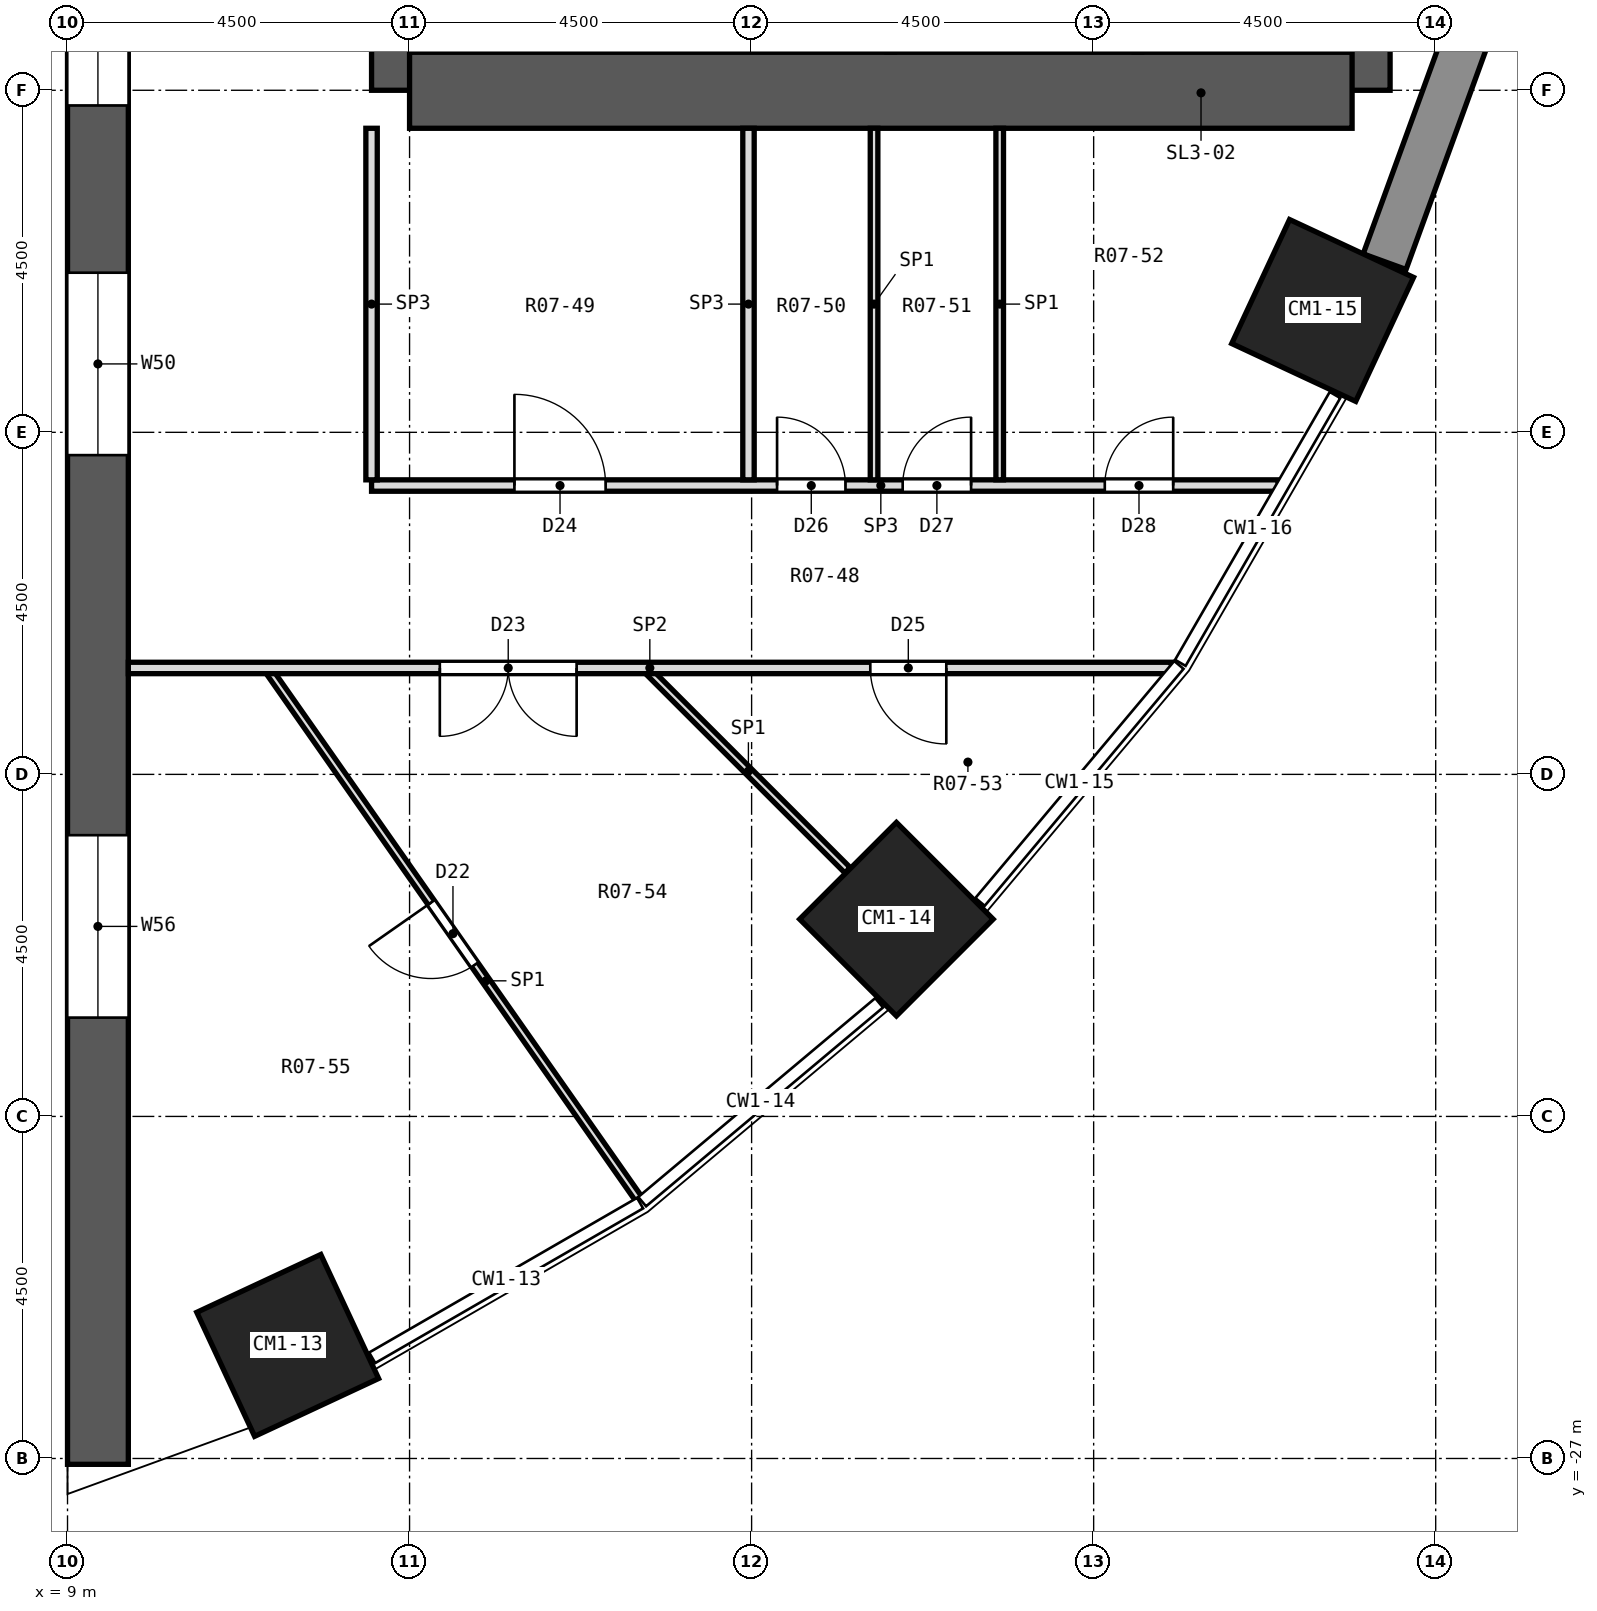
"""IFC4 building model, lengths in metres.
Left out: names, types, materials, properties, quantities, classifications, styles, units other than length and angle.
Written with IfcOpenShell. Run it as: python <this file> out.ifc"""

import sys

from ifc_helpers import new_model, si_unit, direction, frame, frame_2d, origin, origin_2d, place, context, subcontext, project, spatial, polyline, rectangle, outline, extrude, element, fill, save


model = new_model("IFC4")
c1 = context("Model", 3, precision=1e-05, world=origin(), true_north=direction((0.0, 1.0)))
c2 = subcontext(c1, "Body", "Model", "MODEL_VIEW")
j1 = project(units=[si_unit("LENGTHUNIT", "METRE"), si_unit("PLANEANGLEUNIT", "RADIAN")], contexts=[c1])
p1 = place(None, origin())
s1 = spatial("IfcSite", under=j1, at=p1, CompositionType="ELEMENT")
p2 = place(p1, origin())
s2 = spatial("IfcBuilding", under=s1, at=p2, CompositionType="ELEMENT")
p3 = place(p2, frame((0.0, 0.0, 17.6)))
s3 = spatial("IfcBuildingStorey", under=s2, at=p3, CompositionType="ELEMENT", Elevation=17.6)
for number, where, z_axis, x_axis in (
    (1, (11.897, -25.512, 0.0), (0.0, 0.0, 1.0), (0.423, -0.906, 0.0)),
    (2, (19.905, -19.905, 0.0), (0.0, 0.0, 1.0), (0.707, -0.707, 0.0)),
    (3, (25.512, -11.897, 0.0), (0.0, 0.0, 1.0), (0.906, -0.423, 0.0)),
):
    element("IfcColumn", number, at=place(p3, frame(where, z_axis=z_axis, x_axis=x_axis)), inside=s3, PredefinedType="COLUMN", context=c2, shape_type="SweptSolid", body=[
        extrude(rectangle(XDim=1.8, YDim=1.8, at=origin_2d()), origin(), (0.0, 0.0, 1.0), 4.2),
    ])
p4 = place(p3, frame((13.5, -9.0, 0.0), z_axis=(0.0, 0.0, 1.0), x_axis=(0.0, 1.0, 0.0)))
e4 = element("IfcWall", 4, at=p4, inside=s3, PredefinedType="SHEAR", context=c2, shape_type="SweptSolid", body=[
    extrude(rectangle(XDim=18.0, YDim=1.0, at=frame_2d((9.0, 0.0))), origin(), (0.0, 0.0, 1.0), 4.2),
])
p5 = place(p4, frame((15.4, 0.0, 0.0)))
e5 = element("IfcOpeningElement", 5, at=p5, cuts=e4, PredefinedType="OPENING", context=c2, shape_type="SweptSolid", body=[
    extrude(rectangle(XDim=1.2, YDim=2.1, at=frame_2d((0.6, 1.05))), frame((0.0, 0.512, 0.0), z_axis=(0.0, -1.0, 0.0), x_axis=(1.0, 0.0, 0.0)), (0.0, 0.0, 1.0), 1.024),
])
p6 = place(p4, frame((1.4, 0.0, 0.0)))
e6 = element("IfcOpeningElement", 6, at=p6, cuts=e4, PredefinedType="OPENING", context=c2, shape_type="SweptSolid", body=[
    extrude(rectangle(XDim=1.2, YDim=2.1, at=frame_2d((0.6, 1.05))), frame((0.0, 0.512, 0.0), z_axis=(0.0, -1.0, 0.0), x_axis=(1.0, 0.0, 0.0)), (0.0, 0.0, 1.0), 1.024),
])
p7 = place(p4, frame((7.5, 0.0, 0.0)))
e7 = element("IfcOpeningElement", 7, at=p7, cuts=e4, PredefinedType="OPENING", context=c2, shape_type="SweptSolid", body=[
    extrude(rectangle(XDim=3.0, YDim=2.4, at=frame_2d((1.5, 1.2))), frame((0.0, 0.512, 0.0), z_axis=(0.0, -1.0, 0.0), x_axis=(1.0, 0.0, 0.0)), (0.0, 0.0, 1.0), 1.024),
])
p8 = place(p3, frame((25.9, -9.0, 0.0), z_axis=(0.0, 0.0, 1.0), x_axis=(0.0, 1.0, 0.0)))
e8 = element("IfcWall", 8, at=p8, inside=s3, PredefinedType="SHEAR", context=c2, shape_type="SweptSolid", body=[
    extrude(rectangle(XDim=18.0, YDim=1.0, at=frame_2d((9.0, 0.0))), origin(), (0.0, 0.0, 1.0), 4.2),
])
p9 = place(p3, frame((13.5, -9.0, 0.0), z_axis=(0.0, 0.0, 1.0), x_axis=(1.0, 0.0, 0.0)))
e9 = element("IfcWall", 9, at=p9, inside=s3, PredefinedType="SHEAR", context=c2, shape_type="SweptSolid", body=[
    extrude(rectangle(XDim=12.4, YDim=1.0, at=frame_2d((6.2, 0.0))), origin(), (0.0, 0.0, 1.0), 4.2),
])
p10 = place(p3, frame((9.4, -27.077, 0.0), z_axis=(0.0, 0.0, 1.0), x_axis=(0.0, 1.0, 0.0)))
e10 = element("IfcWall", 10, at=p10, inside=s3, PredefinedType="SHEAR", context=c2, shape_type="SweptSolid", body=[
    extrude(rectangle(XDim=54.154, YDim=0.8, at=frame_2d((27.077, 0.0))), origin(), (0.0, 0.0, 1.0), 4.2),
])
p11 = place(p10, frame((13.277, 0.0, 0.9)))
e11 = element("IfcOpeningElement", 11, at=p11, cuts=e10, PredefinedType="OPENING", context=c2, shape_type="SweptSolid", body=[
    extrude(rectangle(XDim=2.4, YDim=2.1, at=frame_2d((1.2, 1.05))), frame((0.0, 0.412, 0.0), z_axis=(0.0, -1.0, 0.0), x_axis=(1.0, 0.0, 0.0)), (0.0, 0.0, 1.0), 0.824),
])
p12 = place(p10, frame((17.877, 0.0, 0.9)))
e12 = element("IfcOpeningElement", 12, at=p12, cuts=e10, PredefinedType="OPENING", context=c2, shape_type="SweptSolid", body=[
    extrude(rectangle(XDim=2.4, YDim=2.1, at=frame_2d((1.2, 1.05))), frame((0.0, 0.412, 0.0), z_axis=(0.0, -1.0, 0.0), x_axis=(1.0, 0.0, 0.0)), (0.0, 0.0, 1.0), 0.824),
])
p13 = place(p10, frame((22.477, 0.0, 0.9)))
e13 = element("IfcOpeningElement", 13, at=p13, cuts=e10, PredefinedType="OPENING", context=c2, shape_type="SweptSolid", body=[
    extrude(rectangle(XDim=2.4, YDim=2.1, at=frame_2d((1.2, 1.05))), frame((0.0, 0.412, 0.0), z_axis=(0.0, -1.0, 0.0), x_axis=(1.0, 0.0, 0.0)), (0.0, 0.0, 1.0), 0.824),
])
p14 = place(p10, frame((29.277, 0.0, 0.9)))
e14 = element("IfcOpeningElement", 14, at=p14, cuts=e10, PredefinedType="OPENING", context=c2, shape_type="SweptSolid", body=[
    extrude(rectangle(XDim=2.4, YDim=2.1, at=frame_2d((1.2, 1.05))), frame((0.0, 0.412, 0.0), z_axis=(0.0, -1.0, 0.0), x_axis=(1.0, 0.0, 0.0)), (0.0, 0.0, 1.0), 0.824),
])
p15 = place(p10, frame((33.877, 0.0, 0.9)))
e15 = element("IfcOpeningElement", 15, at=p15, cuts=e10, PredefinedType="OPENING", context=c2, shape_type="SweptSolid", body=[
    extrude(rectangle(XDim=2.4, YDim=2.1, at=frame_2d((1.2, 1.05))), frame((0.0, 0.412, 0.0), z_axis=(0.0, -1.0, 0.0), x_axis=(1.0, 0.0, 0.0)), (0.0, 0.0, 1.0), 0.824),
])
p16 = place(p10, frame((38.477, 0.0, 0.9)))
e16 = element("IfcOpeningElement", 16, at=p16, cuts=e10, PredefinedType="OPENING", context=c2, shape_type="SweptSolid", body=[
    extrude(rectangle(XDim=2.4, YDim=2.1, at=frame_2d((1.2, 1.05))), frame((0.0, 0.412, 0.0), z_axis=(0.0, -1.0, 0.0), x_axis=(1.0, 0.0, 0.0)), (0.0, 0.0, 1.0), 0.824),
])
p17 = place(p10, frame((5.877, 0.0, 0.9)))
e17 = element("IfcOpeningElement", 17, at=p17, cuts=e10, PredefinedType="OPENING", context=c2, shape_type="SweptSolid", body=[
    extrude(rectangle(XDim=2.4, YDim=2.1, at=frame_2d((1.2, 1.05))), frame((0.0, 0.412, 0.0), z_axis=(0.0, -1.0, 0.0), x_axis=(1.0, 0.0, 0.0)), (0.0, 0.0, 1.0), 0.824),
])
p18 = place(p10, frame((45.877, 0.0, 0.9)))
e18 = element("IfcOpeningElement", 18, at=p18, cuts=e10, PredefinedType="OPENING", context=c2, shape_type="SweptSolid", body=[
    extrude(rectangle(XDim=2.4, YDim=2.1, at=frame_2d((1.2, 1.05))), frame((0.0, 0.412, 0.0), z_axis=(0.0, -1.0, 0.0), x_axis=(1.0, 0.0, 0.0)), (0.0, 0.0, 1.0), 0.824),
])
p19 = place(p3, frame((26.328, -11.255, 0.0), z_axis=(0.0, 0.0, 1.0), x_axis=(0.342034744565, 0.939687306241, 0.0)))
e19 = element("IfcWall", 19, at=p19, inside=s3, PredefinedType="SOLIDWALL", context=c2, shape_type="SweptSolid", body=[
    extrude(rectangle(XDim=4.099, YDim=0.6, at=frame_2d((2.05, 0.0))), origin(), (0.0, 0.0, 1.0), 3.6),
])
p20 = place(p3, frame((8.109, -27.755, 0.0), z_axis=(0.342019725657, -0.939690559381, 0.002039576307), x_axis=(-0.000746014046, 0.001898944844, 0.999997918734)))
e20 = element("IfcWall", 20, at=p20, inside=s3, PredefinedType="SOLIDWALL", context=c2, shape_type="SweptSolid", body=[
    extrude(outline(polyline([(0.0, 0.0), (3.6, -1.084e-19), (3.6, -3.745), (-0.0, -3.745), (0.0, 0.0)])), origin(), (0.0, 0.0, -1.0), 0.38),
])
p21 = place(p3, frame((11.666, -16.661, 0.0), z_axis=(0.0, 0.0, 1.0), x_axis=(0.573640514793, -0.819107172346, 0.0)))
e21 = element("IfcWall", 21, at=p21, inside=s3, PredefinedType="PARTITIONING", context=c2, shape_type="SweptSolid", body=[
    extrude(rectangle(XDim=8.46, YDim=0.1, at=frame_2d((4.23, 0.0))), origin(), (0.0, 0.0, 1.0), 3.6),
])
p22 = place(p21, frame((3.692, 0.0, 0.0)))
e22 = element("IfcOpeningElement", 22, at=p22, cuts=e21, PredefinedType="OPENING", context=c2, shape_type="SweptSolid", body=[
    extrude(rectangle(XDim=1.0, YDim=2.1, at=frame_2d((0.5, 1.05))), frame((0.0, 0.062, 0.0), z_axis=(0.0, -1.0, 0.0), x_axis=(1.0, 0.0, 0.0)), (0.0, 0.0, 1.0), 0.124),
])
p23 = place(p3, frame((16.653, -16.653, 0.0), z_axis=(0.0, 0.0, 1.0), x_axis=(0.707272213363, -0.706941310297, 0.0)))
e23 = element("IfcWall", 23, at=p23, inside=s3, PredefinedType="PARTITIONING", context=c2, shape_type="SweptSolid", body=[
    extrude(rectangle(XDim=3.689, YDim=0.1, at=frame_2d((1.844, 0.0))), origin(), (0.0, 0.0, 1.0), 3.6),
])
p24 = place(p3, frame((9.8, -16.6, 0.0), z_axis=(0.0, 0.0, 1.0), x_axis=(1.0, 0.0, 0.0)))
e24 = element("IfcWall", 24, at=p24, inside=s3, PredefinedType="PARTITIONING", context=c2, shape_type="SweptSolid", body=[
    extrude(rectangle(XDim=13.723, YDim=0.15, at=frame_2d((6.861, 0.0))), origin(), (0.0, 0.0, 1.0), 3.6),
])
p25 = place(p24, frame((4.098, 0.0, 0.0)))
e25 = element("IfcOpeningElement", 25, at=p25, cuts=e24, PredefinedType="OPENING", context=c2, shape_type="SweptSolid", body=[
    extrude(rectangle(XDim=1.8, YDim=2.1, at=frame_2d((0.9, 1.05))), frame((0.0, 0.087, 0.0), z_axis=(0.0, -1.0, 0.0), x_axis=(1.0, 0.0, 0.0)), (0.0, 0.0, 1.0), 0.174),
])
p26 = place(p24, frame((9.761, 0.0, 0.0)))
e26 = element("IfcOpeningElement", 26, at=p26, cuts=e24, PredefinedType="OPENING", context=c2, shape_type="SweptSolid", body=[
    extrude(rectangle(XDim=1.0, YDim=2.1, at=frame_2d((0.5, 1.05))), frame((0.0, 0.087, 0.0), z_axis=(0.0, -1.0, 0.0), x_axis=(1.0, 0.0, 0.0)), (0.0, 0.0, 1.0), 0.174),
])
p27 = place(p3, frame((13.0, -14.2, 0.0), z_axis=(0.0, 0.0, 1.0), x_axis=(1.0, 0.0, 0.0)))
e27 = element("IfcWall", 27, at=p27, inside=s3, PredefinedType="PARTITIONING", context=c2, shape_type="SweptSolid", body=[
    extrude(rectangle(XDim=11.929, YDim=0.15, at=frame_2d((5.964, 0.0))), origin(), (0.0, 0.0, 1.0), 3.6),
])
p28 = place(p27, frame((1.879, 0.0, 0.0)))
e28 = element("IfcOpeningElement", 28, at=p28, cuts=e27, PredefinedType="OPENING", context=c2, shape_type="SweptSolid", body=[
    extrude(rectangle(XDim=1.2, YDim=2.1, at=frame_2d((0.6, 1.05))), frame((0.0, 0.087, 0.0), z_axis=(0.0, -1.0, 0.0), x_axis=(1.0, 0.0, 0.0)), (0.0, 0.0, 1.0), 0.174),
])
p29 = place(p27, frame((5.335, 0.0, 0.0)))
e29 = element("IfcOpeningElement", 29, at=p29, cuts=e27, PredefinedType="OPENING", context=c2, shape_type="SweptSolid", body=[
    extrude(rectangle(XDim=0.9, YDim=2.1, at=frame_2d((0.45, 1.05))), frame((0.0, 0.087, 0.0), z_axis=(0.0, -1.0, 0.0), x_axis=(1.0, 0.0, 0.0)), (0.0, 0.0, 1.0), 0.174),
])
p30 = place(p27, frame((6.988, 0.0, 0.0)))
e30 = element("IfcOpeningElement", 30, at=p30, cuts=e27, PredefinedType="OPENING", context=c2, shape_type="SweptSolid", body=[
    extrude(rectangle(XDim=0.9, YDim=2.1, at=frame_2d((0.45, 1.05))), frame((0.0, 0.087, 0.0), z_axis=(0.0, -1.0, 0.0), x_axis=(1.0, 0.0, 0.0)), (0.0, 0.0, 1.0), 0.174),
])
p31 = place(p27, frame((9.646, 0.0, 0.0)))
e31 = element("IfcOpeningElement", 31, at=p31, cuts=e27, PredefinedType="OPENING", context=c2, shape_type="SweptSolid", body=[
    extrude(rectangle(XDim=0.9, YDim=2.1, at=frame_2d((0.45, 1.05))), frame((0.0, 0.087, 0.0), z_axis=(0.0, -1.0, 0.0), x_axis=(1.0, 0.0, 0.0)), (0.0, 0.0, 1.0), 0.174),
])
for number, where, z_axis, x_axis in (
    (32, (21.264, -14.125, 0.0), (0.0, 0.0, 1.0), (0.0, 1.0, 0.0)),
    (33, (19.611, -14.125, 0.0), (0.0, 0.0, 1.0), (0.0, 1.0, 0.0)),
):
    element("IfcWall", number, at=place(p3, frame(where, z_axis=z_axis, x_axis=x_axis)), inside=s3, PredefinedType="PARTITIONING", context=c2, shape_type="SweptSolid", body=[
        extrude(rectangle(XDim=4.625, YDim=0.1, at=frame_2d((2.312, 0.0))), origin(), (0.0, 0.0, 1.0), 3.6),
    ])
for number, where, z_axis, x_axis in (
    (34, (17.959, -14.125, 0.0), (0.0, 0.0, 1.0), (0.0, 1.0, 0.0)),
    (35, (13.0, -14.125, 0.0), (0.0, 0.0, 1.0), (0.0, 1.0, 0.0)),
):
    element("IfcWall", number, at=place(p3, frame(where, z_axis=z_axis, x_axis=x_axis)), inside=s3, PredefinedType="PARTITIONING", context=c2, shape_type="SweptSolid", body=[
        extrude(rectangle(XDim=4.625, YDim=0.15, at=frame_2d((2.312, 0.0))), origin(), (0.0, 0.0, 1.0), 3.6),
    ])
p32 = place(p22, frame((1.0, 0.0, 0.0), z_axis=(0.0, 0.0, 1.0), x_axis=(-1.0, 0.0, 0.0)))
e36 = element("IfcDoor", 36, at=p32, inside=s3, OperationType="SINGLE_SWING_RIGHT", PredefinedType="DOOR", context=c2, shape_type="SweptSolid", body=[
    extrude(rectangle(XDim=1.0, YDim=2.1, at=frame_2d((0.5, 1.05))), frame((0.0, 0.025, 0.0), z_axis=(0.0, -1.0, 0.0), x_axis=(1.0, 0.0, 0.0)), (0.0, 0.0, 1.0), 0.05),
])
fill(e22, e36)
p33 = place(p25, frame((1.8, 0.0, 0.0), z_axis=(0.0, 0.0, 1.0), x_axis=(-1.0, 0.0, 0.0)))
e37 = element("IfcDoor", 37, at=p33, inside=s3, OperationType="DOUBLE_DOOR_SINGLE_SWING", PredefinedType="DOOR", context=c2, shape_type="SweptSolid", body=[
    extrude(rectangle(XDim=1.8, YDim=2.1, at=frame_2d((0.9, 1.05))), frame((0.0, 0.025, 0.0), z_axis=(0.0, -1.0, 0.0), x_axis=(1.0, 0.0, 0.0)), (0.0, 0.0, 1.0), 0.05),
])
fill(e25, e37)
p34 = place(p28, origin())
e38 = element("IfcDoor", 38, at=p34, inside=s3, OperationType="SINGLE_SWING_LEFT", PredefinedType="DOOR", context=c2, shape_type="SweptSolid", body=[
    extrude(rectangle(XDim=1.2, YDim=2.1, at=frame_2d((0.6, 1.05))), frame((0.0, 0.025, 0.0), z_axis=(0.0, -1.0, 0.0), x_axis=(1.0, 0.0, 0.0)), (0.0, 0.0, 1.0), 0.05),
])
fill(e28, e38)
p35 = place(p26, frame((1.0, 0.0, 0.0), z_axis=(0.0, 0.0, 1.0), x_axis=(-1.0, 0.0, 0.0)))
e39 = element("IfcDoor", 39, at=p35, inside=s3, OperationType="SINGLE_SWING_LEFT", PredefinedType="DOOR", context=c2, shape_type="SweptSolid", body=[
    extrude(rectangle(XDim=1.0, YDim=2.1, at=frame_2d((0.5, 1.05))), frame((0.0, 0.025, 0.0), z_axis=(0.0, -1.0, 0.0), x_axis=(1.0, 0.0, 0.0)), (0.0, 0.0, 1.0), 0.05),
])
fill(e26, e39)
p36 = place(p29, origin())
e40 = element("IfcDoor", 40, at=p36, inside=s3, OperationType="SINGLE_SWING_LEFT", PredefinedType="DOOR", context=c2, shape_type="SweptSolid", body=[
    extrude(rectangle(XDim=0.9, YDim=2.1, at=frame_2d((0.45, 1.05))), frame((0.0, 0.025, 0.0), z_axis=(0.0, -1.0, 0.0), x_axis=(1.0, 0.0, 0.0)), (0.0, 0.0, 1.0), 0.05),
])
fill(e29, e40)
p37 = place(p30, origin())
e41 = element("IfcDoor", 41, at=p37, inside=s3, OperationType="SINGLE_SWING_RIGHT", PredefinedType="DOOR", context=c2, shape_type="SweptSolid", body=[
    extrude(rectangle(XDim=0.9, YDim=2.1, at=frame_2d((0.45, 1.05))), frame((0.0, 0.025, 0.0), z_axis=(0.0, -1.0, 0.0), x_axis=(1.0, 0.0, 0.0)), (0.0, 0.0, 1.0), 0.05),
])
fill(e30, e41)
p38 = place(p31, origin())
e42 = element("IfcDoor", 42, at=p38, inside=s3, OperationType="SINGLE_SWING_RIGHT", PredefinedType="DOOR", context=c2, shape_type="SweptSolid", body=[
    extrude(rectangle(XDim=0.9, YDim=2.1, at=frame_2d((0.45, 1.05))), frame((0.0, 0.025, 0.0), z_axis=(0.0, -1.0, 0.0), x_axis=(1.0, 0.0, 0.0)), (0.0, 0.0, 1.0), 0.05),
])
fill(e31, e42)
p39 = place(p11, origin())
e43 = element("IfcWindow", 43, at=p39, inside=s3, PartitioningType="SINGLE_PANEL", PredefinedType="WINDOW", context=c2, shape_type="SweptSolid", body=[
    extrude(rectangle(XDim=2.4, YDim=2.1, at=frame_2d((1.2, 1.05))), frame((0.0, 0.03, 0.0), z_axis=(0.0, -1.0, 0.0), x_axis=(1.0, 0.0, 0.0)), (0.0, 0.0, 1.0), 0.06),
])
fill(e11, e43)
p40 = place(p12, origin())
e44 = element("IfcWindow", 44, at=p40, inside=s3, PartitioningType="SINGLE_PANEL", PredefinedType="WINDOW", context=c2, shape_type="SweptSolid", body=[
    extrude(rectangle(XDim=2.4, YDim=2.1, at=frame_2d((1.2, 1.05))), frame((0.0, 0.03, 0.0), z_axis=(0.0, -1.0, 0.0), x_axis=(1.0, 0.0, 0.0)), (0.0, 0.0, 1.0), 0.06),
])
fill(e12, e44)
p41 = place(p17, origin())
e45 = element("IfcWindow", 45, at=p41, inside=s3, PartitioningType="SINGLE_PANEL", PredefinedType="WINDOW", context=c2, shape_type="SweptSolid", body=[
    extrude(rectangle(XDim=2.4, YDim=2.1, at=frame_2d((1.2, 1.05))), frame((0.0, 0.03, 0.0), z_axis=(0.0, -1.0, 0.0), x_axis=(1.0, 0.0, 0.0)), (0.0, 0.0, 1.0), 0.06),
])
fill(e17, e45)
save(model, sys.argv[1])
